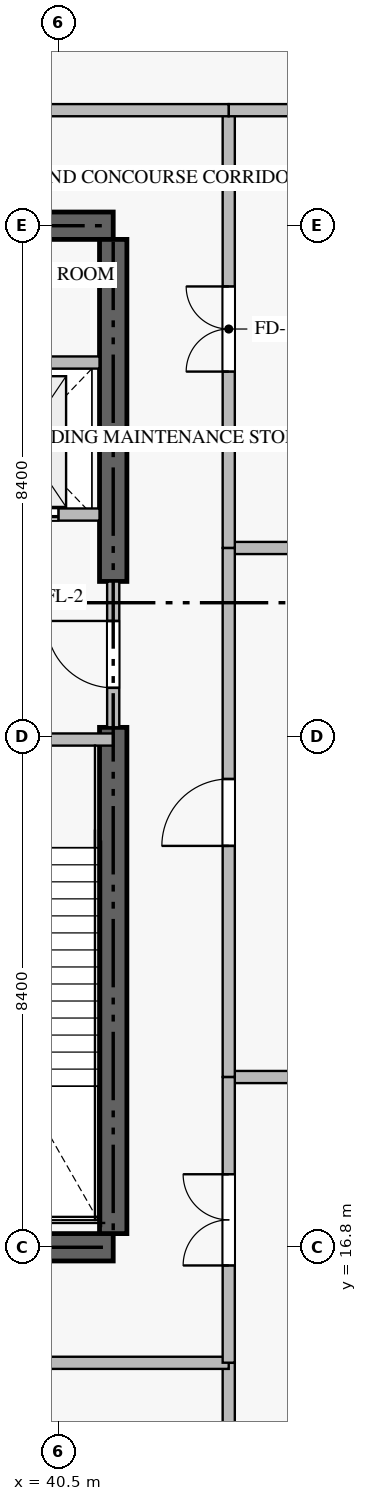
"""IFC4 building model, lengths in metres.
Left out: names, types, materials, properties, quantities, classifications, styles, units other than length and angle.
Written with IfcOpenShell. Run it as: python <this file> out.ifc"""

import sys

from ifc_helpers import new_model, si_unit, direction, frame, frame_2d, origin, place, context, subcontext, project, spatial, rectangle, extrude, source, transform, mapped, element, fill, save


model = new_model("IFC4")
c1 = context("Model", 3, precision=1e-05, world=origin(), true_north=direction((0.0, 1.0)))
c2 = subcontext(c1, "Body", "Model", "MODEL_VIEW")
j1 = project(units=[si_unit("LENGTHUNIT", "METRE"), si_unit("PLANEANGLEUNIT", "RADIAN")], contexts=[c1])
p1 = place(None, origin())
s1 = spatial("IfcSite", under=j1, at=p1, CompositionType="ELEMENT")
p2 = place(p1, origin())
s2 = spatial("IfcBuilding", under=s1, at=p2, CompositionType="ELEMENT")
p3 = place(p2, origin())
s3 = spatial("IfcBuildingStorey", under=s2, at=p3, CompositionType="ELEMENT", Elevation=0.0)
for number, where, z_axis, x_axis in (
    (1, (23.4, 16.8, -0.38), (0.0, 0.0, 1.0), (1.0, 0.0, 0.0)),
    (2, (41.4, 33.6, -0.38), (0.0, 0.0, 1.0), (-1.0, 0.0, 0.0)),
):
    element("IfcWall", number, at=place(p3, frame(where, z_axis=z_axis, x_axis=x_axis)), inside=s3, PredefinedType="SHEAR", context=c2, shape_type="SweptSolid", body=[
        extrude(rectangle(XDim=18.0, YDim=0.45, at=frame_2d((9.0, 0.0))), origin(), (0.0, 0.0, 1.0), 5.498),
    ])
p4 = place(p3, frame((41.4, 17.025, -0.38), z_axis=(0.0, 0.0, 1.0), x_axis=(0.0, 1.0, 0.0)))
e3 = element("IfcWall", 3, at=p4, inside=s3, PredefinedType="SHEAR", context=c2, shape_type="SweptSolid", body=[
    extrude(rectangle(XDim=8.325, YDim=0.45, at=frame_2d((4.163, 0.0))), origin(), (0.0, 0.0, 1.0), 5.498),
])
p5 = place(p3, frame((41.4, 27.75, -0.38), z_axis=(0.0, 0.0, 1.0), x_axis=(0.0, 1.0, 0.0)))
e4 = element("IfcWall", 4, at=p5, inside=s3, PredefinedType="SHEAR", context=c2, shape_type="SweptSolid", body=[
    extrude(rectangle(XDim=5.625, YDim=0.45, at=frame_2d((2.812, 0.0))), origin(), (0.0, 0.0, 1.0), 5.498),
])
p6 = place(p3, frame((36.95, 25.15, 0.0), z_axis=(0.0, 0.0, 1.0), x_axis=(1.0, 0.0, 0.0)))
e5 = element("IfcWall", 5, at=p6, inside=s3, PredefinedType="STANDARD", context=c2, shape_type="SweptSolid", body=[
    extrude(rectangle(XDim=4.45, YDim=0.2, at=frame_2d((2.225, 0.0))), origin(), (0.0, 0.0, 1.0), 5.12),
])
p7 = place(p6, frame((1.65, 0.0, 0.0)))
e6 = element("IfcOpeningElement", 6, at=p7, cuts=e5, PredefinedType="OPENING", context=c2, shape_type="SweptSolid", body=[
    extrude(rectangle(XDim=1.1, YDim=2.15, at=frame_2d((0.55, 1.075))), frame((0.0, 0.11, 0.0), z_axis=(0.0, -1.0, 0.0), x_axis=(1.0, 0.0, 0.0)), (0.0, 0.0, 1.0), 0.22),
])
p8 = place(p3, frame((38.75, 28.85, 0.0), z_axis=(0.0, 0.0, 1.0), x_axis=(1.0, 0.0, 0.0)))
e7 = element("IfcWall", 7, at=p8, inside=s3, PredefinedType="STANDARD", context=c2, shape_type="SweptSolid", body=[
    extrude(rectangle(XDim=2.425, YDim=0.2, at=frame_2d((1.212, 0.0))), origin(), (0.0, 0.0, 1.0), 5.12),
])
p9 = place(p8, frame((0.55, 0.0, 0.0)))
e8 = element("IfcOpeningElement", 8, at=p9, cuts=e7, PredefinedType="OPENING", context=c2, shape_type="SweptSolid", body=[
    extrude(rectangle(XDim=1.2, YDim=2.2, at=frame_2d((0.6, 1.1))), frame((0.0, 0.11, 0.0), z_axis=(0.0, -1.0, 0.0), x_axis=(1.0, 0.0, 0.0)), (0.0, 0.0, 1.0), 0.22),
])
p10 = place(p3, frame((38.75, 31.35, 0.0), z_axis=(0.0, 0.0, 1.0), x_axis=(1.0, 0.0, 0.0)))
e9 = element("IfcWall", 9, at=p10, inside=s3, PredefinedType="STANDARD", context=c2, shape_type="SweptSolid", body=[
    extrude(rectangle(XDim=2.425, YDim=0.2, at=frame_2d((1.212, 0.0))), origin(), (0.0, 0.0, 1.0), 5.12),
])
p11 = place(p3, frame((41.4, 25.352, 0.0), z_axis=(0.0, 0.0, 1.0), x_axis=(0.0, 1.0, 0.0)))
e10 = element("IfcWall", 10, at=p11, inside=s3, PredefinedType="STANDARD", context=c2, shape_type="SweptSolid", body=[
    extrude(rectangle(XDim=2.396, YDim=0.2, at=frame_2d((1.198, 0.0))), origin(), (0.0, 0.0, 1.0), 5.12),
])
p12 = place(p11, frame((0.648, 0.0, 0.0)))
e11 = element("IfcOpeningElement", 11, at=p12, cuts=e10, PredefinedType="OPENING", context=c2, shape_type="SweptSolid", body=[
    extrude(rectangle(XDim=1.1, YDim=2.15, at=frame_2d((0.55, 1.075))), frame((0.0, 0.11, 0.0), z_axis=(0.0, -1.0, 0.0), x_axis=(1.0, 0.0, 0.0)), (0.0, 0.0, 1.0), 0.22),
])
p13 = place(p3, frame((43.3, 4.282, 0.0), z_axis=(0.0, 0.0, 1.0), x_axis=(0.0, 1.0, 0.0)))
e12 = element("IfcWall", 12, at=p13, inside=s3, PredefinedType="STANDARD", context=c2, shape_type="SweptSolid", body=[
    extrude(rectangle(XDim=10.618, YDim=0.2, at=frame_2d((5.309, 0.0))), origin(), (0.0, 0.0, 1.0), 5.12),
])
p14 = place(p3, frame((43.3, 19.6, 0.0), z_axis=(0.0, 0.0, 1.0), x_axis=(1.0, 0.0, 0.0)))
e13 = element("IfcWall", 13, at=p14, inside=s3, PredefinedType="STANDARD", context=c2, shape_type="SweptSolid", body=[
    extrude(rectangle(XDim=21.418, YDim=0.2, at=frame_2d((10.709, 0.0))), origin(), (0.0, 0.0, 1.0), 5.12),
])
p15 = place(p3, frame((43.3, 28.3, 0.0), z_axis=(0.0, 0.0, 1.0), x_axis=(1.0, 0.0, 0.0)))
e14 = element("IfcWall", 14, at=p15, inside=s3, PredefinedType="STANDARD", context=c2, shape_type="SweptSolid", body=[
    extrude(rectangle(XDim=16.378, YDim=0.2, at=frame_2d((8.189, 0.0))), origin(), (0.0, 0.0, 1.0), 5.12),
])
p16 = place(p3, frame((21.5, 14.9, 0.0), z_axis=(0.0, 0.0, 1.0), x_axis=(1.0, 0.0, 0.0)))
e15 = element("IfcWall", 15, at=p16, inside=s3, PredefinedType="STANDARD", context=c2, shape_type="SweptSolid", body=[
    extrude(rectangle(XDim=21.8, YDim=0.2, at=frame_2d((10.9, 0.0))), origin(), (0.0, 0.0, 1.0), 5.12),
])
p17 = place(p16, frame((10.1, 0.0, 0.0)))
e16 = element("IfcOpeningElement", 16, at=p17, cuts=e15, PredefinedType="OPENING", context=c2, shape_type="SweptSolid", body=[
    extrude(rectangle(XDim=1.6, YDim=2.3, at=frame_2d((0.8, 1.15))), frame((0.0, 0.11, 0.0), z_axis=(0.0, -1.0, 0.0), x_axis=(1.0, 0.0, 0.0)), (0.0, 0.0, 1.0), 0.22),
])
p18 = place(p3, frame((43.3, 14.902, 0.0), z_axis=(0.0, 0.0, 1.0), x_axis=(0.0, 1.0, 0.0)))
e17 = element("IfcWall", 17, at=p18, inside=s3, PredefinedType="STANDARD", context=c2, shape_type="SweptSolid", body=[
    extrude(rectangle(XDim=4.698, YDim=0.2, at=frame_2d((2.349, 0.0))), origin(), (0.0, 0.0, 1.0), 5.12),
])
p19 = place(p18, frame((1.599, 0.0, 0.0)))
e18 = element("IfcOpeningElement", 18, at=p19, cuts=e17, PredefinedType="OPENING", context=c2, shape_type="SweptSolid", body=[
    extrude(rectangle(XDim=1.5, YDim=2.25, at=frame_2d((0.75, 1.125))), frame((0.0, 0.11, 0.0), z_axis=(0.0, -1.0, 0.0), x_axis=(1.0, 0.0, 0.0)), (0.0, 0.0, 1.0), 0.22),
])
p20 = place(p3, frame((43.3, 19.602, 0.0), z_axis=(0.0, 0.0, 1.0), x_axis=(0.0, 1.0, 0.0)))
e19 = element("IfcWall", 19, at=p20, inside=s3, PredefinedType="STANDARD", context=c2, shape_type="SweptSolid", body=[
    extrude(rectangle(XDim=8.698, YDim=0.2, at=frame_2d((4.349, 0.0))), origin(), (0.0, 0.0, 1.0), 5.12),
])
p21 = place(p20, frame((3.799, 0.0, 0.0)))
e20 = element("IfcOpeningElement", 20, at=p21, cuts=e19, PredefinedType="OPENING", context=c2, shape_type="SweptSolid", body=[
    extrude(rectangle(XDim=1.1, YDim=2.15, at=frame_2d((0.55, 1.075))), frame((0.0, 0.11, 0.0), z_axis=(0.0, -1.0, 0.0), x_axis=(1.0, 0.0, 0.0)), (0.0, 0.0, 1.0), 0.22),
])
p22 = place(p3, frame((43.3, 28.302, 0.0), z_axis=(0.0, 0.0, 1.0), x_axis=(0.0, 1.0, 0.0)))
e21 = element("IfcWall", 21, at=p22, inside=s3, PredefinedType="STANDARD", context=c2, shape_type="SweptSolid", body=[
    extrude(rectangle(XDim=7.198, YDim=0.2, at=frame_2d((3.599, 0.0))), origin(), (0.0, 0.0, 1.0), 5.12),
])
p23 = place(p22, frame((2.899, 0.0, 0.0)))
e22 = element("IfcOpeningElement", 22, at=p23, cuts=e21, PredefinedType="OPENING", context=c2, shape_type="SweptSolid", body=[
    extrude(rectangle(XDim=1.4, YDim=2.2, at=frame_2d((0.7, 1.1))), frame((0.0, 0.11, 0.0), z_axis=(0.0, -1.0, 0.0), x_axis=(1.0, 0.0, 0.0)), (0.0, 0.0, 1.0), 0.22),
])
p24 = place(p3, frame((43.3, 35.5, 0.0), z_axis=(0.0, 0.0, 1.0), x_axis=(1.0, 0.0, 0.0)))
e23 = element("IfcWall", 23, at=p24, inside=s3, PredefinedType="STANDARD", context=c2, shape_type="SweptSolid", body=[
    extrude(rectangle(XDim=3.1, YDim=0.2, at=frame_2d((1.55, 0.0))), origin(), (0.0, 0.0, 1.0), 5.12),
])
p25 = place(p3, frame((34.102, 35.5, 0.0), z_axis=(0.0, 0.0, 1.0), x_axis=(1.0, 0.0, 0.0)))
e24 = element("IfcWall", 24, at=p25, inside=s3, PredefinedType="STANDARD", context=c2, shape_type="SweptSolid", body=[
    extrude(rectangle(XDim=9.196, YDim=0.2, at=frame_2d((4.598, 0.0))), origin(), (0.0, 0.0, 1.0), 5.12),
])
p26 = place(p25, frame((3.898, 0.0, 0.0)))
e25 = element("IfcOpeningElement", 25, at=p26, cuts=e24, PredefinedType="OPENING", context=c2, shape_type="SweptSolid", body=[
    extrude(rectangle(XDim=1.4, YDim=2.2, at=frame_2d((0.7, 1.1))), frame((0.0, 0.11, 0.0), z_axis=(0.0, -1.0, 0.0), x_axis=(1.0, 0.0, 0.0)), (0.0, 0.0, 1.0), 0.22),
])
m1 = source(origin(), c2, "Body", "SweptSolid", [
    extrude(rectangle(XDim=1.2, YDim=2.2, at=frame_2d((0.6, 1.1))), frame((0.0, 0.025, 0.0), z_axis=(0.0, -1.0, 0.0), x_axis=(1.0, 0.0, 0.0)), (0.0, 0.0, 1.0), 0.05),
])
p27 = place(p9, origin())
e26 = element("IfcDoor", 26, at=p27, inside=s3, OperationType="DOUBLE_DOOR_SLIDING", PredefinedType="DOOR", context=c2, shape_type="MappedRepresentation", body=[
    mapped(m1, transform((0.0, 0.0, 0.0), scale=1.0)),
])
fill(e8, e26)
m2 = source(origin(), c2, "Body", "SweptSolid", [
    extrude(rectangle(XDim=1.1, YDim=2.15, at=frame_2d((0.55, 1.075))), frame((0.0, 0.025, 0.0), z_axis=(0.0, -1.0, 0.0), x_axis=(1.0, 0.0, 0.0)), (0.0, 0.0, 1.0), 0.05),
])
p28 = place(p12, origin())
e27 = element("IfcDoor", 27, at=p28, inside=s3, OperationType="SINGLE_SWING_RIGHT", PredefinedType="DOOR", context=c2, shape_type="MappedRepresentation", body=[
    mapped(m2, transform((0.0, 0.0, 0.0), scale=1.0)),
])
fill(e11, e27)
m3 = source(origin(), c2, "Body", "SweptSolid", [
    extrude(rectangle(XDim=1.5, YDim=2.25, at=frame_2d((0.75, 1.125))), frame((0.0, 0.025, 0.0), z_axis=(0.0, -1.0, 0.0), x_axis=(1.0, 0.0, 0.0)), (0.0, 0.0, 1.0), 0.05),
])
p29 = place(p19, origin())
e28 = element("IfcDoor", 28, at=p29, inside=s3, OperationType="DOUBLE_DOOR_SINGLE_SWING", PredefinedType="DOOR", context=c2, shape_type="MappedRepresentation", body=[
    mapped(m3, transform((0.0, 0.0, 0.0), scale=1.0)),
])
fill(e18, e28)
p30 = place(p21, origin())
e29 = element("IfcDoor", 29, at=p30, inside=s3, OperationType="SINGLE_SWING_LEFT", PredefinedType="DOOR", context=c2, shape_type="MappedRepresentation", body=[
    mapped(m2, transform((0.0, 0.0, 0.0), scale=1.0)),
])
fill(e20, e29)
m4 = source(origin(), c2, "Body", "SweptSolid", [
    extrude(rectangle(XDim=1.4, YDim=2.2, at=frame_2d((0.7, 1.1))), frame((0.0, 0.025, 0.0), z_axis=(0.0, -1.0, 0.0), x_axis=(1.0, 0.0, 0.0)), (0.0, 0.0, 1.0), 0.05),
])
p31 = place(p23, origin())
e30 = element("IfcDoor", 30, at=p31, inside=s3, OperationType="DOUBLE_DOOR_SINGLE_SWING", PredefinedType="DOOR", context=c2, shape_type="MappedRepresentation", body=[
    mapped(m4, transform((0.0, 0.0, 0.0), scale=1.0)),
])
fill(e22, e30)
save(model, sys.argv[1])
